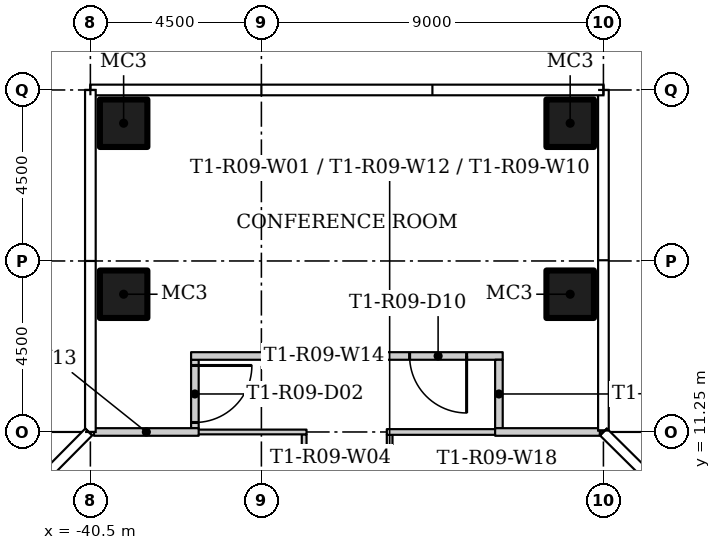
"""IFC4 building model, lengths in metres.
Left out: names, types, materials, properties, quantities, classifications, styles, units other than length and angle.
Written with IfcOpenShell. Run it as: python <this file> out.ifc"""

import sys

from ifc_helpers import new_model, si_unit, direction, frame, frame_2d, origin, origin_2d, place, context, subcontext, project, spatial, rectangle, hollow_rectangle, extrude, element, fill, save


model = new_model("IFC4")
c1 = context("Model", 3, precision=1e-05, world=origin(), true_north=direction((0.0, 1.0)))
c2 = subcontext(c1, "Body", "Model", "MODEL_VIEW")
j1 = project(units=[si_unit("LENGTHUNIT", "METRE"), si_unit("PLANEANGLEUNIT", "RADIAN")], contexts=[c1])
p1 = place(None, origin())
s1 = spatial("IfcSite", under=j1, at=p1, CompositionType="ELEMENT")
p2 = place(p1, origin())
s2 = spatial("IfcBuilding", under=s1, at=p2, CompositionType="ELEMENT")
p3 = place(p2, frame((0.0, 0.0, 89.7)))
s3 = spatial("IfcBuildingStorey", under=s2, at=p3, CompositionType="ELEMENT", Elevation=89.7)
for number, where in (
    (1, (-39.625, 14.875, 0.0)),
    (2, (-39.625, 19.375, 0.0)),
    (3, (-27.875, 14.875, 0.0)),
    (4, (-27.875, 19.375, 0.0)),
):
    element("IfcColumn", number, at=place(p3, frame(where)), inside=s3, PredefinedType="COLUMN", context=c2, shape_type="SweptSolid", body=[
        extrude(hollow_rectangle(XDim=1.25, YDim=1.25, WallThickness=0.05, at=origin_2d()), origin(), (0.0, 0.0, 1.0), 3.55),
    ])
p4 = place(p3, frame((-32.625, 11.175, 0.0), z_axis=(0.0, 0.0, 1.0), x_axis=(0.0, -1.0, 0.0)))
e5 = element("IfcWall", 5, at=p4, inside=s3, PredefinedType="PARTITIONING", context=c2, shape_type="SweptSolid", body=[
    extrude(rectangle(XDim=4.35, YDim=0.15, at=frame_2d((2.175, 0.0))), origin(), (0.0, 0.0, 1.0), 3.55),
])
p5 = place(p4, frame((1.425, 0.0, 0.0)))
e6 = element("IfcOpeningElement", 6, at=p5, cuts=e5, PredefinedType="OPENING", context=c2, shape_type="SweptSolid", body=[
    extrude(rectangle(XDim=1.5, YDim=2.1, at=frame_2d((0.75, 1.05))), frame((0.0, 0.085, 0.0), z_axis=(0.0, -1.0, 0.0), x_axis=(1.0, 0.0, 0.0)), (0.0, 0.0, 1.0), 0.17),
])
p6 = place(p3, frame((-29.65, 11.25, 0.0), z_axis=(0.0, 0.0, 1.0), x_axis=(-1.0, 0.0, 0.0)))
e7 = element("IfcWall", 7, at=p6, inside=s3, PredefinedType="PARTITIONING", context=c2, shape_type="SweptSolid", body=[
    extrude(rectangle(XDim=3.05, YDim=0.15, at=frame_2d((1.525, 0.0))), origin(), (0.0, 0.0, 1.0), 3.55),
])
p7 = place(p3, frame((-34.875, 6.825, 0.0), z_axis=(0.0, 0.0, 1.0), x_axis=(0.0, 1.0, 0.0)))
e8 = element("IfcWall", 8, at=p7, inside=s3, PredefinedType="PARTITIONING", context=c2, shape_type="SweptSolid", body=[
    extrude(rectangle(XDim=4.363, YDim=0.125, at=frame_2d((2.181, 0.0))), origin(), (0.0, 0.0, 1.0), 3.55),
])
p8 = place(p7, frame((1.725, 0.0, 0.0)))
e9 = element("IfcOpeningElement", 9, at=p8, cuts=e8, PredefinedType="OPENING", context=c2, shape_type="SweptSolid", body=[
    extrude(rectangle(XDim=0.9, YDim=2.1, at=frame_2d((0.45, 1.05))), frame((0.0, 0.073, 0.0), z_axis=(0.0, -1.0, 0.0), x_axis=(1.0, 0.0, 0.0)), (0.0, 0.0, 1.0), 0.145),
])
p9 = place(p3, frame((-34.812, 11.25, 0.0), z_axis=(0.0, 0.0, 1.0), x_axis=(-1.0, 0.0, 0.0)))
e10 = element("IfcWall", 10, at=p9, inside=s3, PredefinedType="PARTITIONING", context=c2, shape_type="SweptSolid", body=[
    extrude(rectangle(XDim=3.038, YDim=0.125, at=frame_2d((1.519, 0.0))), origin(), (0.0, 0.0, 1.0), 3.55),
])
p10 = place(p3, frame((-37.75, 13.15, 0.0), z_axis=(0.0, 0.0, 1.0), x_axis=(0.0, -1.0, 0.0)))
e11 = element("IfcWall", 11, at=p10, inside=s3, PredefinedType="PARTITIONING", context=c2, shape_type="SweptSolid", body=[
    extrude(rectangle(XDim=1.8, YDim=0.2, at=frame_2d((0.9, 0.0))), origin(), (0.0, 0.0, 1.0), 3.55),
])
p11 = place(p10, frame((0.15, 0.0, 0.0)))
e12 = element("IfcOpeningElement", 12, at=p11, cuts=e11, PredefinedType="OPENING", context=c2, shape_type="SweptSolid", body=[
    extrude(rectangle(XDim=1.5, YDim=2.4, at=frame_2d((0.75, 1.2))), frame((0.0, 0.11, 0.0), z_axis=(0.0, -1.0, 0.0), x_axis=(1.0, 0.0, 0.0)), (0.0, 0.0, 1.0), 0.22),
])
p12 = place(p3, frame((-29.65, 13.25, 0.0), z_axis=(0.0, 0.0, 1.0), x_axis=(-1.0, 0.0, 0.0)))
e13 = element("IfcWall", 13, at=p12, inside=s3, PredefinedType="PARTITIONING", context=c2, shape_type="SweptSolid", body=[
    extrude(rectangle(XDim=8.2, YDim=0.2, at=frame_2d((4.1, 0.0))), origin(), (0.0, 0.0, 1.0), 3.55),
])
p13 = place(p12, frame((0.95, 0.0, 0.0)))
e14 = element("IfcOpeningElement", 14, at=p13, cuts=e13, PredefinedType="OPENING", context=c2, shape_type="SweptSolid", body=[
    extrude(rectangle(XDim=1.5, YDim=2.4, at=frame_2d((0.75, 1.2))), frame((0.0, 0.11, 0.0), z_axis=(0.0, -1.0, 0.0), x_axis=(1.0, 0.0, 0.0)), (0.0, 0.0, 1.0), 0.22),
])
p14 = place(p3, frame((-29.75, 11.35, 0.0), z_axis=(0.0, 0.0, 1.0), x_axis=(0.0, 1.0, 0.0)))
e15 = element("IfcWall", 15, at=p14, inside=s3, PredefinedType="PARTITIONING", context=c2, shape_type="SweptSolid", body=[
    extrude(rectangle(XDim=1.8, YDim=0.2, at=frame_2d((0.9, 0.0))), origin(), (0.0, 0.0, 1.0), 3.55),
])
for number, where, z_axis, x_axis in (
    (16, (-27.095, 11.25, 0.0), (0.0, 0.0, 1.0), (-1.0, 0.0, 0.0)),
    (17, (-37.65, 11.25, 0.0), (0.0, 0.0, 1.0), (-1.0, 0.0, 0.0)),
):
    element("IfcWall", number, at=place(p3, frame(where, z_axis=z_axis, x_axis=x_axis)), inside=s3, PredefinedType="PARTITIONING", context=c2, shape_type="SweptSolid", body=[
        extrude(rectangle(XDim=2.755, YDim=0.2, at=frame_2d((1.377, 0.0))), origin(), (0.0, 0.0, 1.0), 3.55),
    ])
p15 = place(p11, origin())
e18 = element("IfcDoor", 18, at=p15, inside=s3, OperationType="DOUBLE_DOOR_SINGLE_SWING", PredefinedType="DOOR", context=c2, shape_type="SweptSolid", body=[
    extrude(rectangle(XDim=1.5, YDim=2.4, at=frame_2d((0.75, 1.2))), frame((0.0, 0.025, 0.0), z_axis=(0.0, -1.0, 0.0), x_axis=(1.0, 0.0, 0.0)), (0.0, 0.0, 1.0), 0.05),
])
fill(e12, e18)
p16 = place(p13, origin())
e19 = element("IfcDoor", 19, at=p16, inside=s3, OperationType="DOUBLE_DOOR_SINGLE_SWING", PredefinedType="DOOR", context=c2, shape_type="SweptSolid", body=[
    extrude(rectangle(XDim=1.5, YDim=2.4, at=frame_2d((0.75, 1.2))), frame((0.0, 0.025, 0.0), z_axis=(0.0, -1.0, 0.0), x_axis=(1.0, 0.0, 0.0)), (0.0, 0.0, 1.0), 0.05),
])
fill(e14, e19)
save(model, sys.argv[1])
